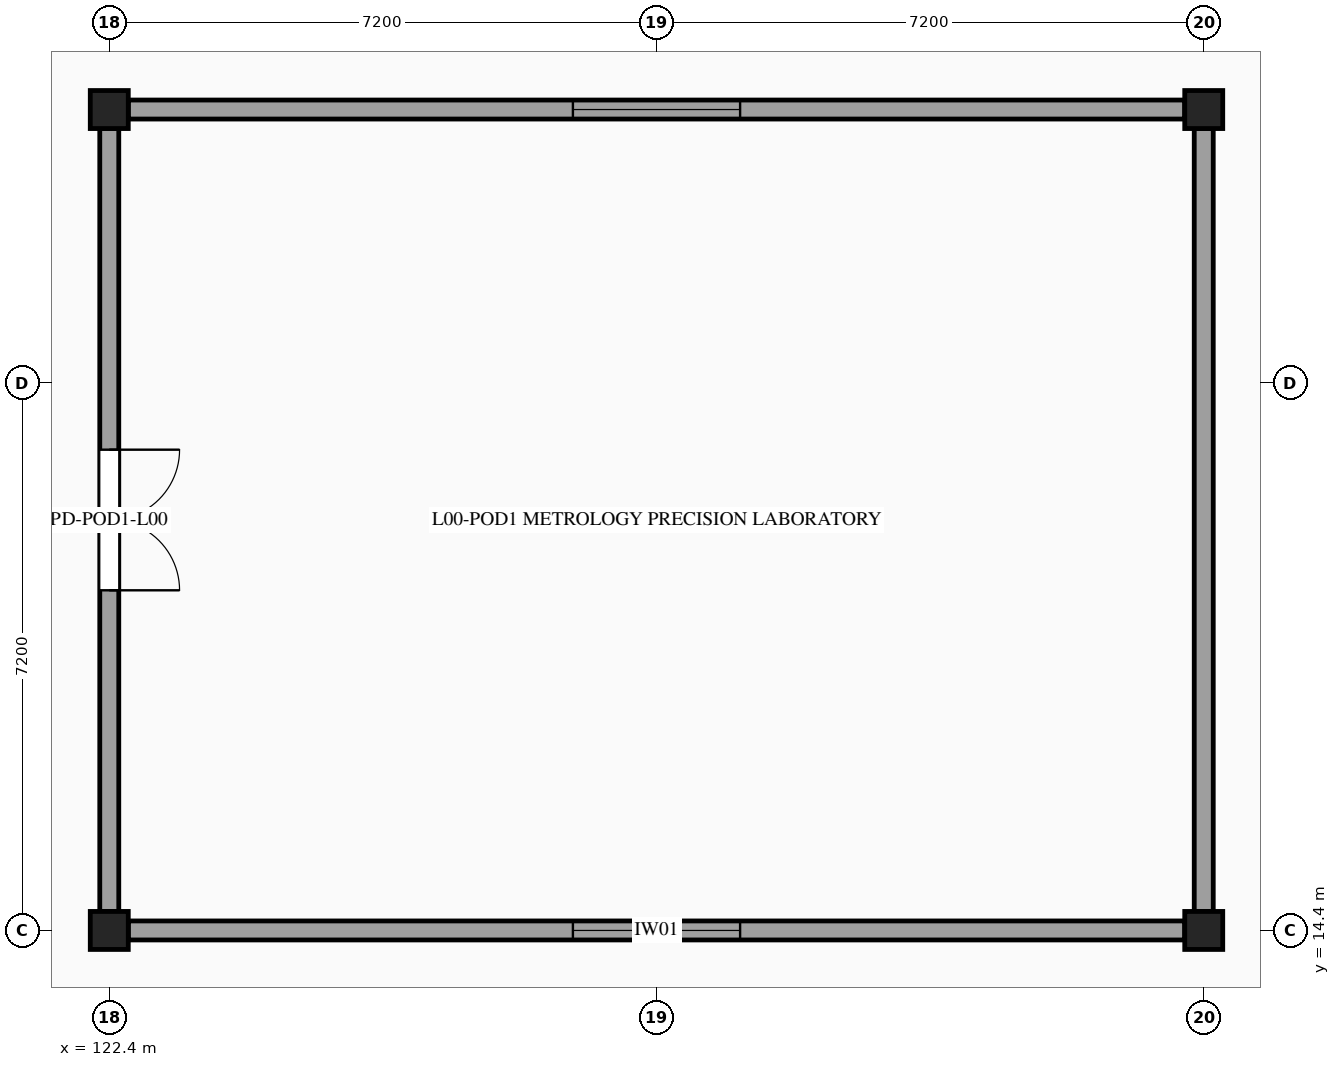
"""IFC4 building model, lengths in metres.
Left out: names, types, materials, properties, quantities, classifications, styles, units other than length and angle.
Written with IfcOpenShell. Run it as: python <this file> out.ifc"""

import sys

from ifc_helpers import new_model, si_unit, direction, frame, frame_2d, origin, origin_2d, place, context, subcontext, project, spatial, rectangle, extrude, element, fill, save


model = new_model("IFC4")
c1 = context("Model", 3, precision=1e-05, world=origin(), true_north=direction((0.0, 1.0)))
c2 = subcontext(c1, "Body", "Model", "MODEL_VIEW")
j1 = project(units=[si_unit("LENGTHUNIT", "METRE"), si_unit("PLANEANGLEUNIT", "RADIAN")], contexts=[c1])
p1 = place(None, origin())
s1 = spatial("IfcSite", under=j1, at=p1, CompositionType="ELEMENT")
p2 = place(p1, origin())
s2 = spatial("IfcBuilding", under=s1, at=p2, CompositionType="ELEMENT")
p3 = place(p2, origin())
s3 = spatial("IfcBuildingStorey", under=s2, at=p3, CompositionType="ELEMENT", Elevation=0.0)
for number, where, z_axis, x_axis in (
    (1, (122.4, 14.4, 0.0), (0.0, 0.0, 1.0), (1.0, 0.0, 0.0)),
    (2, (122.4, 25.2, 0.0), (0.0, 0.0, 1.0), (1.0, 0.0, 0.0)),
    (3, (136.8, 14.4, 0.0), (0.0, 0.0, 1.0), (1.0, 0.0, 0.0)),
    (4, (136.8, 25.2, 0.0), (0.0, 0.0, 1.0), (1.0, 0.0, 0.0)),
):
    element("IfcColumn", number, at=place(p3, frame(where, z_axis=z_axis, x_axis=x_axis)), inside=s3, PredefinedType="COLUMN", context=c2, shape_type="SweptSolid", body=[
        extrude(rectangle(XDim=0.5, YDim=0.5, at=origin_2d()), origin(), (0.0, 0.0, 1.0), 4.5),
    ])
p4 = place(p3, frame((122.65, 14.4, 0.0), z_axis=(0.0, 0.0, 1.0), x_axis=(1.0, 0.0, 0.0)))
e5 = element("IfcWall", 5, at=p4, inside=s3, PredefinedType="PARTITIONING", context=c2, shape_type="SweptSolid", body=[
    extrude(rectangle(XDim=13.9, YDim=0.25, at=frame_2d((6.95, 0.0))), origin(), (0.0, 0.0, 1.0), 3.57),
])
p5 = place(p4, frame((5.85, 0.0, 1.1)))
e6 = element("IfcOpeningElement", 6, at=p5, cuts=e5, PredefinedType="OPENING", context=c2, shape_type="SweptSolid", body=[
    extrude(rectangle(XDim=2.2, YDim=1.3, at=frame_2d((1.1, 0.65))), frame((0.0, 0.135, 0.0), z_axis=(0.0, -1.0, 0.0), x_axis=(1.0, 0.0, 0.0)), (0.0, 0.0, 1.0), 0.27),
])
p6 = place(p3, frame((136.8, 14.65, 0.0), z_axis=(0.0, 0.0, 1.0), x_axis=(0.0, 1.0, 0.0)))
e7 = element("IfcWall", 7, at=p6, inside=s3, PredefinedType="PARTITIONING", context=c2, shape_type="SweptSolid", body=[
    extrude(rectangle(XDim=10.3, YDim=0.25, at=frame_2d((5.15, 0.0))), origin(), (0.0, 0.0, 1.0), 3.57),
])
p7 = place(p3, frame((136.55, 25.2, 0.0), z_axis=(0.0, 0.0, 1.0), x_axis=(-1.0, 0.0, 0.0)))
e8 = element("IfcWall", 8, at=p7, inside=s3, PredefinedType="PARTITIONING", context=c2, shape_type="SweptSolid", body=[
    extrude(rectangle(XDim=13.9, YDim=0.25, at=frame_2d((6.95, 0.0))), origin(), (0.0, 0.0, 1.0), 3.57),
])
p8 = place(p7, frame((5.85, 0.0, 1.1)))
e9 = element("IfcOpeningElement", 9, at=p8, cuts=e8, PredefinedType="OPENING", context=c2, shape_type="SweptSolid", body=[
    extrude(rectangle(XDim=2.2, YDim=1.3, at=frame_2d((1.1, 0.65))), frame((0.0, 0.135, 0.0), z_axis=(0.0, -1.0, 0.0), x_axis=(1.0, 0.0, 0.0)), (0.0, 0.0, 1.0), 0.27),
])
p9 = place(p3, frame((122.4, 24.95, 0.0), z_axis=(0.0, 0.0, 1.0), x_axis=(0.0, -1.0, 0.0)))
e10 = element("IfcWall", 10, at=p9, inside=s3, PredefinedType="PARTITIONING", context=c2, shape_type="SweptSolid", body=[
    extrude(rectangle(XDim=10.3, YDim=0.25, at=frame_2d((5.15, 0.0))), origin(), (0.0, 0.0, 1.0), 3.57),
])
p10 = place(p9, frame((4.225, 0.0, 0.0)))
e11 = element("IfcOpeningElement", 11, at=p10, cuts=e10, PredefinedType="OPENING", context=c2, shape_type="SweptSolid", body=[
    extrude(rectangle(XDim=1.85, YDim=2.3, at=frame_2d((0.925, 1.15))), frame((0.0, 0.135, 0.0), z_axis=(0.0, -1.0, 0.0), x_axis=(1.0, 0.0, 0.0)), (0.0, 0.0, 1.0), 0.27),
])
p11 = place(p5, origin())
e12 = element("IfcWindow", 12, at=p11, inside=s3, PartitioningType="SINGLE_PANEL", PredefinedType="WINDOW", context=c2, shape_type="SweptSolid", body=[
    extrude(rectangle(XDim=2.2, YDim=1.3, at=frame_2d((1.1, 0.65))), frame((0.0, 0.03, 0.0), z_axis=(0.0, -1.0, 0.0), x_axis=(1.0, 0.0, 0.0)), (0.0, 0.0, 1.0), 0.06),
])
fill(e6, e12)
p12 = place(p8, origin())
e13 = element("IfcWindow", 13, at=p12, inside=s3, PartitioningType="SINGLE_PANEL", PredefinedType="WINDOW", context=c2, shape_type="SweptSolid", body=[
    extrude(rectangle(XDim=2.2, YDim=1.3, at=frame_2d((1.1, 0.65))), frame((0.0, 0.03, 0.0), z_axis=(0.0, -1.0, 0.0), x_axis=(1.0, 0.0, 0.0)), (0.0, 0.0, 1.0), 0.06),
])
fill(e9, e13)
p13 = place(p10, frame((1.85, 0.0, 0.0), z_axis=(0.0, 0.0, 1.0), x_axis=(-1.0, 0.0, 0.0)))
e14 = element("IfcDoor", 14, at=p13, inside=s3, OperationType="DOUBLE_DOOR_SINGLE_SWING", PredefinedType="DOOR", context=c2, shape_type="SweptSolid", body=[
    extrude(rectangle(XDim=1.85, YDim=2.3, at=frame_2d((0.925, 1.15))), frame((0.0, 0.025, 0.0), z_axis=(0.0, -1.0, 0.0), x_axis=(1.0, 0.0, 0.0)), (0.0, 0.0, 1.0), 0.05),
])
fill(e11, e14)
save(model, sys.argv[1])
